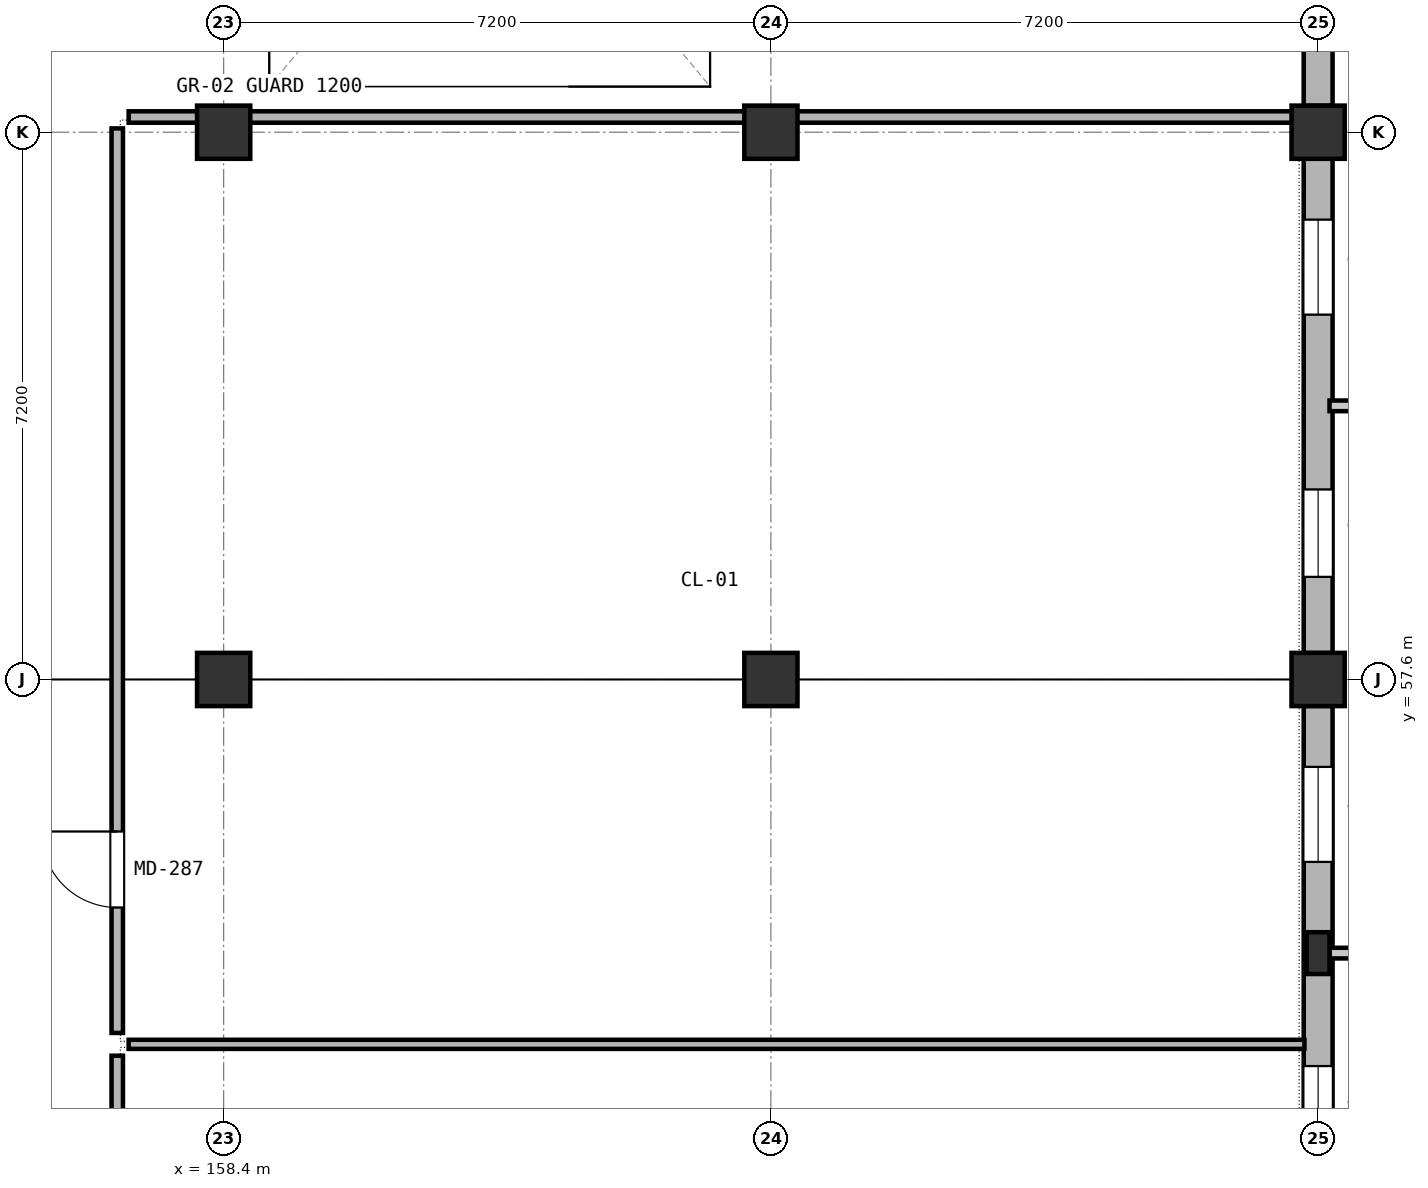
"""IFC4 building model, lengths in metres.
Left out: names, types, materials, properties, quantities, classifications, styles, units other than length and angle.
Written with IfcOpenShell. Run it as: python <this file> out.ifc"""

import sys

from ifc_helpers import new_model, si_unit, direction, frame, frame_2d, origin, origin_2d, place, context, subcontext, project, spatial, rectangle, extrude, element, fill, save


model = new_model("IFC4")
c1 = context("Model", 3, precision=1e-05, world=origin(), true_north=direction((0.0, 1.0)))
c2 = subcontext(c1, "Body", "Model", "MODEL_VIEW")
j1 = project(units=[si_unit("LENGTHUNIT", "METRE"), si_unit("PLANEANGLEUNIT", "RADIAN")], contexts=[c1])
p1 = place(None, origin())
s1 = spatial("IfcSite", under=j1, at=p1, CompositionType="ELEMENT")
p2 = place(p1, origin())
s2 = spatial("IfcBuilding", under=s1, at=p2, CompositionType="ELEMENT")
p3 = place(p2, frame((0.0, 0.0, 10.2)))
s3 = spatial("IfcBuildingStorey", under=s2, at=p3, CompositionType="ELEMENT", Elevation=10.2)
for number, where, z_axis, x_axis in (
    (1, (158.4, 57.6, 0.0), (0.0, 0.0, 1.0), (1.0, 0.0, 0.0)),
    (2, (158.4, 64.8, 0.0), (0.0, 0.0, 1.0), (1.0, 0.0, 0.0)),
    (3, (165.6, 57.6, 0.0), (0.0, 0.0, 1.0), (1.0, 0.0, 0.0)),
    (4, (165.6, 64.8, 0.0), (0.0, 0.0, 1.0), (1.0, 0.0, 0.0)),
    (5, (172.8, 57.6, 0.0), (0.0, 0.0, 1.0), (1.0, 0.0, 0.0)),
    (6, (172.8, 64.8, 0.0), (0.0, 0.0, 1.0), (1.0, 0.0, 0.0)),
):
    element("IfcColumn", number, at=place(p3, frame(where, z_axis=z_axis, x_axis=x_axis)), inside=s3, PredefinedType="COLUMN", context=c2, shape_type="SweptSolid", body=[
        extrude(rectangle(XDim=0.7, YDim=0.7, at=origin_2d()), origin(), (0.0, 0.0, 1.0), 4.2),
    ])
p4 = place(p3, frame((172.8, 54.0, 0.0), z_axis=(0.0, 0.0, 1.0), x_axis=(0.0, 1.0, 0.0)))
e7 = element("IfcColumn", 7, at=p4, inside=s3, PredefinedType="PILASTER", context=c2, shape_type="SweptSolid", body=[
    extrude(rectangle(XDim=0.55, YDim=0.3, at=origin_2d()), origin(), (0.0, 0.0, 1.0), 4.2),
])
p5 = place(p3, frame((172.8, 57.252, 0.0), z_axis=(0.0, 0.0, 1.0), x_axis=(0.0, -1.0, 0.0)))
e8 = element("IfcWall", 8, at=p5, inside=s3, PredefinedType="SOLIDWALL", context=c2, shape_type="SweptSolid", body=[
    extrude(rectangle(XDim=6.504, YDim=0.38, at=frame_2d((3.252, 0.0))), origin(), (0.0, 0.0, 1.0), 3.04),
])
p6 = place(p5, frame((0.802, 0.0, 0.65)))
e9 = element("IfcOpeningElement", 9, at=p6, cuts=e8, PredefinedType="OPENING", context=c2, shape_type="SweptSolid", body=[
    extrude(rectangle(XDim=1.25, YDim=2.24, at=frame_2d((0.625, 1.12))), frame((0.0, 0.2, 0.0), z_axis=(0.0, -1.0, 0.0), x_axis=(1.0, 0.0, 0.0)), (0.0, 0.0, 1.0), 0.4),
])
p7 = place(p5, frame((4.738, 0.0, 0.65)))
e10 = element("IfcOpeningElement", 10, at=p7, cuts=e8, PredefinedType="OPENING", context=c2, shape_type="SweptSolid", body=[
    extrude(rectangle(XDim=1.15, YDim=2.24, at=frame_2d((0.575, 1.12))), frame((0.0, 0.2, 0.0), z_axis=(0.0, -1.0, 0.0), x_axis=(1.0, 0.0, 0.0)), (0.0, 0.0, 1.0), 0.4),
])
p8 = place(p3, frame((172.8, 64.452, 0.0), z_axis=(0.0, 0.0, 1.0), x_axis=(0.0, -1.0, 0.0)))
e11 = element("IfcWall", 11, at=p8, inside=s3, PredefinedType="SOLIDWALL", context=c2, shape_type="SweptSolid", body=[
    extrude(rectangle(XDim=6.504, YDim=0.38, at=frame_2d((3.252, 0.0))), origin(), (0.0, 0.0, 1.0), 3.04),
])
p9 = place(p8, frame((0.802, 0.0, 0.65)))
e12 = element("IfcOpeningElement", 12, at=p9, cuts=e11, PredefinedType="OPENING", context=c2, shape_type="SweptSolid", body=[
    extrude(rectangle(XDim=1.25, YDim=2.24, at=frame_2d((0.625, 1.12))), frame((0.0, 0.2, 0.0), z_axis=(0.0, -1.0, 0.0), x_axis=(1.0, 0.0, 0.0)), (0.0, 0.0, 1.0), 0.4),
])
p10 = place(p8, frame((4.352, 0.0, 0.65)))
e13 = element("IfcOpeningElement", 13, at=p10, cuts=e11, PredefinedType="OPENING", context=c2, shape_type="SweptSolid", body=[
    extrude(rectangle(XDim=1.15, YDim=2.24, at=frame_2d((0.575, 1.12))), frame((0.0, 0.2, 0.0), z_axis=(0.0, -1.0, 0.0), x_axis=(1.0, 0.0, 0.0)), (0.0, 0.0, 1.0), 0.4),
])
p11 = place(p3, frame((172.8, 71.652, 0.0), z_axis=(0.0, 0.0, 1.0), x_axis=(0.0, -1.0, 0.0)))
e14 = element("IfcWall", 14, at=p11, inside=s3, PredefinedType="SOLIDWALL", context=c2, shape_type="SweptSolid", body=[
    extrude(rectangle(XDim=6.504, YDim=0.38, at=frame_2d((3.252, 0.0))), origin(), (0.0, 0.0, 1.0), 3.04),
])
p12 = place(p11, frame((0.802, 0.0, 0.65)))
e15 = element("IfcOpeningElement", 15, at=p12, cuts=e14, PredefinedType="OPENING", context=c2, shape_type="SweptSolid", body=[
    extrude(rectangle(XDim=1.25, YDim=2.24, at=frame_2d((0.625, 1.12))), frame((0.0, 0.2, 0.0), z_axis=(0.0, -1.0, 0.0), x_axis=(1.0, 0.0, 0.0)), (0.0, 0.0, 1.0), 0.4),
])
p13 = place(p11, frame((4.352, 0.0, 0.65)))
e16 = element("IfcOpeningElement", 16, at=p13, cuts=e14, PredefinedType="OPENING", context=c2, shape_type="SweptSolid", body=[
    extrude(rectangle(XDim=1.15, YDim=2.24, at=frame_2d((0.575, 1.12))), frame((0.0, 0.2, 0.0), z_axis=(0.0, -1.0, 0.0), x_axis=(1.0, 0.0, 0.0)), (0.0, 0.0, 1.0), 0.4),
])
p14 = place(p3, frame((157.0, 36.95, 0.0), z_axis=(0.0, 0.0, 1.0), x_axis=(0.0, 1.0, 0.0)))
e17 = element("IfcWall", 17, at=p14, inside=s3, PredefinedType="PARTITIONING", context=c2, shape_type="SweptSolid", body=[
    extrude(rectangle(XDim=15.7, YDim=0.15, at=frame_2d((7.85, 0.0))), origin(), (0.0, 0.0, 1.0), 3.08),
])
p15 = place(p14, frame((7.05, 0.0, 0.0)))
e18 = element("IfcOpeningElement", 18, at=p15, cuts=e17, PredefinedType="OPENING", context=c2, shape_type="SweptSolid", body=[
    extrude(rectangle(XDim=1.6, YDim=2.2, at=frame_2d((0.8, 1.1))), frame((0.0, 0.085, 0.0), z_axis=(0.0, -1.0, 0.0), x_axis=(1.0, 0.0, 0.0)), (0.0, 0.0, 1.0), 0.17),
])
p16 = place(p3, frame((157.0, 52.95, 0.0), z_axis=(0.0, 0.0, 1.0), x_axis=(0.0, 1.0, 0.0)))
e19 = element("IfcWall", 19, at=p16, inside=s3, PredefinedType="PARTITIONING", context=c2, shape_type="SweptSolid", body=[
    extrude(rectangle(XDim=11.9, YDim=0.15, at=frame_2d((5.95, 0.0))), origin(), (0.0, 0.0, 1.0), 3.08),
])
p17 = place(p16, frame((1.65, 0.0, 0.0)))
e20 = element("IfcOpeningElement", 20, at=p17, cuts=e19, PredefinedType="OPENING", context=c2, shape_type="SweptSolid", body=[
    extrude(rectangle(XDim=1.0, YDim=2.2, at=frame_2d((0.5, 1.1))), frame((0.0, 0.085, 0.0), z_axis=(0.0, -1.0, 0.0), x_axis=(1.0, 0.0, 0.0)), (0.0, 0.0, 1.0), 0.17),
])
p18 = place(p3, frame((157.15, 52.8, 0.0), z_axis=(0.0, 0.0, 1.0), x_axis=(1.0, 0.0, 0.0)))
e21 = element("IfcWall", 21, at=p18, inside=s3, PredefinedType="PARTITIONING", context=c2, shape_type="SweptSolid", body=[
    extrude(rectangle(XDim=15.47, YDim=0.12, at=frame_2d((7.735, 0.0))), origin(), (0.0, 0.0, 1.0), 3.08),
])
p19 = place(p3, frame((157.15, 65.0, 0.0), z_axis=(0.0, 0.0, 1.0), x_axis=(1.0, 0.0, 0.0)))
e22 = element("IfcWall", 22, at=p19, inside=s3, PredefinedType="PARTITIONING", context=c2, shape_type="SweptSolid", body=[
    extrude(rectangle(XDim=15.47, YDim=0.15, at=frame_2d((7.735, 0.0))), origin(), (0.0, 0.0, 1.0), 3.08),
])
p20 = place(p6, origin())
e23 = element("IfcWindow", 23, at=p20, inside=s3, PartitioningType="DOUBLE_PANEL_VERTICAL", PredefinedType="WINDOW", context=c2, shape_type="SweptSolid", body=[
    extrude(rectangle(XDim=1.25, YDim=2.24, at=frame_2d((0.625, 1.12))), frame((0.0, 0.03, 0.0), z_axis=(0.0, -1.0, 0.0), x_axis=(1.0, 0.0, 0.0)), (0.0, 0.0, 1.0), 0.06),
])
fill(e9, e23)
p21 = place(p7, origin())
e24 = element("IfcWindow", 24, at=p21, inside=s3, PartitioningType="SINGLE_PANEL", PredefinedType="WINDOW", context=c2, shape_type="SweptSolid", body=[
    extrude(rectangle(XDim=1.15, YDim=2.24, at=frame_2d((0.575, 1.12))), frame((0.0, 0.03, 0.0), z_axis=(0.0, -1.0, 0.0), x_axis=(1.0, 0.0, 0.0)), (0.0, 0.0, 1.0), 0.06),
])
fill(e10, e24)
p22 = place(p9, origin())
e25 = element("IfcWindow", 25, at=p22, inside=s3, PartitioningType="DOUBLE_PANEL_VERTICAL", PredefinedType="WINDOW", context=c2, shape_type="SweptSolid", body=[
    extrude(rectangle(XDim=1.25, YDim=2.24, at=frame_2d((0.625, 1.12))), frame((0.0, 0.03, 0.0), z_axis=(0.0, -1.0, 0.0), x_axis=(1.0, 0.0, 0.0)), (0.0, 0.0, 1.0), 0.06),
])
fill(e12, e25)
p23 = place(p10, origin())
e26 = element("IfcWindow", 26, at=p23, inside=s3, PartitioningType="SINGLE_PANEL", PredefinedType="WINDOW", context=c2, shape_type="SweptSolid", body=[
    extrude(rectangle(XDim=1.15, YDim=2.24, at=frame_2d((0.575, 1.12))), frame((0.0, 0.03, 0.0), z_axis=(0.0, -1.0, 0.0), x_axis=(1.0, 0.0, 0.0)), (0.0, 0.0, 1.0), 0.06),
])
fill(e13, e26)
p24 = place(p17, origin())
e27 = element("IfcDoor", 27, at=p24, inside=s3, OperationType="SINGLE_SWING_RIGHT", PredefinedType="DOOR", context=c2, shape_type="SweptSolid", body=[
    extrude(rectangle(XDim=1.0, YDim=2.2, at=frame_2d((0.5, 1.1))), frame((0.0, 0.025, 0.0), z_axis=(0.0, -1.0, 0.0), x_axis=(1.0, 0.0, 0.0)), (0.0, 0.0, 1.0), 0.05),
])
fill(e20, e27)
save(model, sys.argv[1])
